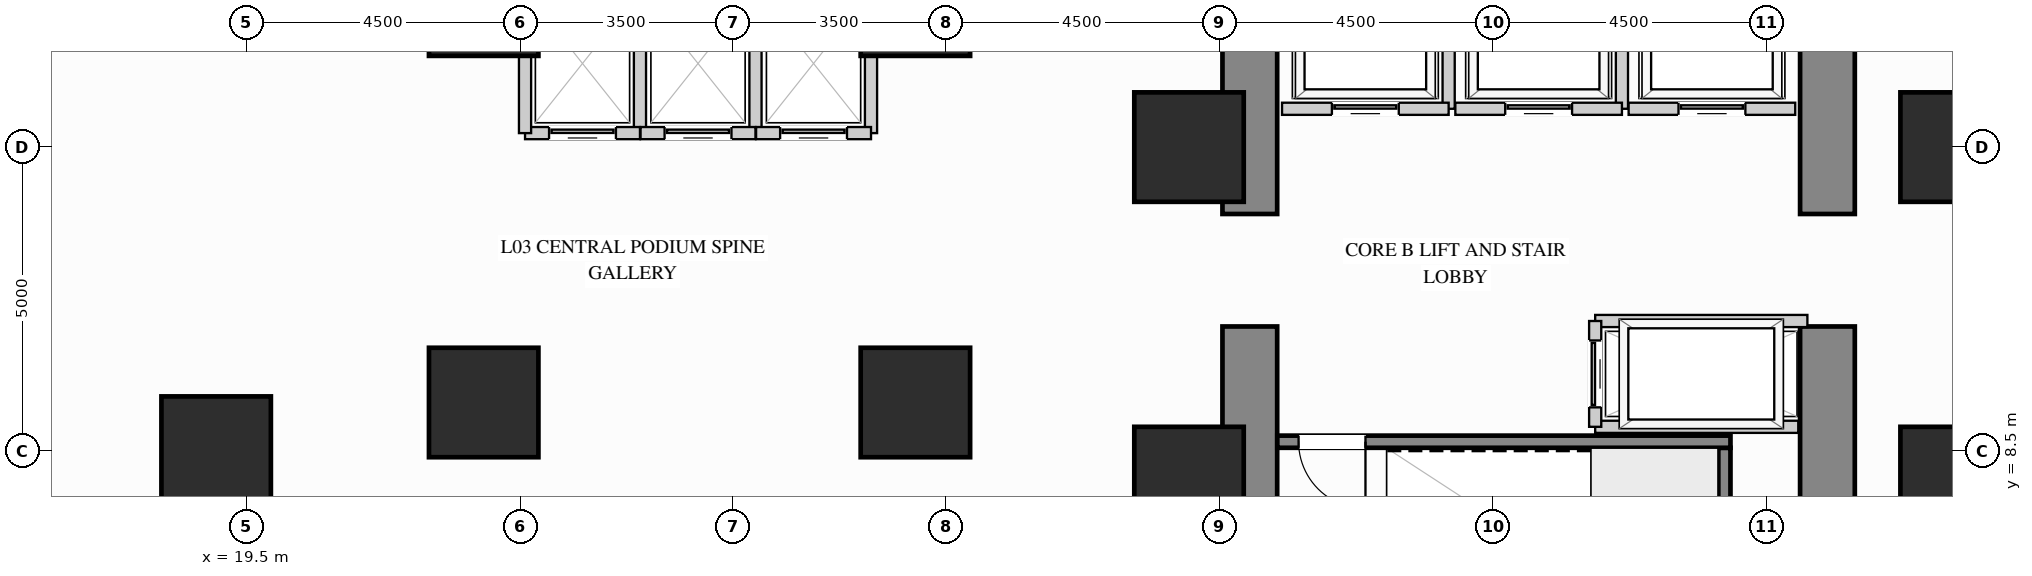
"""IFC4 building model, lengths in metres.
Left out: names, types, materials, properties, quantities, classifications, styles, units other than length and angle.
Written with IfcOpenShell. Run it as: python <this file> out.ifc"""

import sys

from ifc_helpers import new_model, si_unit, direction, frame, frame_2d, origin, origin_2d, place, context, subcontext, project, spatial, rectangle, extrude, source, transform, mapped, element, fill, save


model = new_model("IFC4")
c1 = context("Model", 3, precision=1e-05, world=origin(), true_north=direction((0.0, 1.0)))
c2 = subcontext(c1, "Body", "Model", "MODEL_VIEW")
j1 = project(units=[si_unit("LENGTHUNIT", "METRE"), si_unit("PLANEANGLEUNIT", "RADIAN")], contexts=[c1])
p1 = place(None, origin())
s1 = spatial("IfcSite", under=j1, at=p1, CompositionType="ELEMENT")
p2 = place(p1, origin())
s2 = spatial("IfcBuilding", under=s1, at=p2, CompositionType="ELEMENT")
p3 = place(p2, frame((0.0, 0.0, 13.5)))
s3 = spatial("IfcBuildingStorey", under=s2, at=p3, CompositionType="ELEMENT", Elevation=13.5)
m1 = source(origin(), c2, "Body", "SweptSolid", [
    extrude(rectangle(XDim=1.8, YDim=1.8, at=origin_2d()), origin(), (0.0, 0.0, 1.0), 4.15),
])
for number, where, z_axis, x_axis in (
    (1, (47.6, 8.0, 0.0), (0.0, 0.0, 1.0), (1.0, 0.0, 0.0)),
    (2, (47.6, 13.5, 0.0), (0.0, 0.0, 1.0), (1.0, 0.0, 0.0)),
    (3, (19.0, 8.5, 0.0), (0.0, 0.0, 1.0), (1.0, 0.0, 0.0)),
    (4, (35.0, 8.0, 0.0), (0.0, 0.0, 1.0), (1.0, 0.0, 0.0)),
    (5, (35.0, 13.5, 0.0), (0.0, 0.0, 1.0), (1.0, 0.0, 0.0)),
    (6, (23.4, 9.3, 0.0), (0.0, 0.0, 1.0), (1.0, 0.0, 0.0)),
    (7, (30.5, 9.3, 0.0), (0.0, 0.0, 1.0), (1.0, 0.0, 0.0)),
    (8, (23.4, 15.9, 0.0), (0.0, 0.0, 1.0), (1.0, 0.0, 0.0)),
    (9, (30.5, 15.9, 0.0), (0.0, 0.0, 1.0), (1.0, 0.0, 0.0)),
):
    element("IfcColumn", number, at=place(p3, frame(where, z_axis=z_axis, x_axis=x_axis)), inside=s3, PredefinedType="COLUMN", context=c2, shape_type="MappedRepresentation", body=[
        mapped(m1, transform((0.0, 0.0, 0.0), x_axis=(1.0, 0.0, 0.0), y_axis=(0.0, 1.0, 0.0), z_axis=(0.0, 0.0, 1.0))),
    ])
m2 = source(origin(), c2, "Body", "SweptSolid", [
    extrude(rectangle(XDim=5.6, YDim=0.9, at=frame_2d((2.8, 0.0))), origin(), (0.0, 0.0, 1.0), 4.15),
])
p4 = place(p3, frame((45.5, 4.95, 0.0), z_axis=(0.0, 0.0, 1.0), x_axis=(0.0, 1.0, 0.0)))
e10 = element("IfcWall", 10, at=p4, inside=s3, PredefinedType="SHEAR", context=c2, shape_type="MappedRepresentation", body=[
    mapped(m2, transform((0.0, 0.0, 0.0), x_axis=(1.0, 0.0, 0.0), y_axis=(0.0, 1.0, 0.0), z_axis=(0.0, 0.0, 1.0))),
])
m3 = source(origin(), c2, "Body", "SweptSolid", [
    extrude(rectangle(XDim=3.65, YDim=0.9, at=frame_2d((1.825, 0.0))), origin(), (0.0, 0.0, 1.0), 4.15),
])
p5 = place(p3, frame((45.5, 12.4, 0.0), z_axis=(0.0, 0.0, 1.0), x_axis=(0.0, 1.0, 0.0)))
e11 = element("IfcWall", 11, at=p5, inside=s3, PredefinedType="SHEAR", context=c2, shape_type="MappedRepresentation", body=[
    mapped(m3, transform((0.0, 0.0, 0.0), x_axis=(1.0, 0.0, 0.0), y_axis=(0.0, 1.0, 0.0), z_axis=(0.0, 0.0, 1.0))),
])
p6 = place(p3, frame((36.0, 4.95, 0.0), z_axis=(0.0, 0.0, 1.0), x_axis=(0.0, 1.0, 0.0)))
e12 = element("IfcWall", 12, at=p6, inside=s3, PredefinedType="SHEAR", context=c2, shape_type="MappedRepresentation", body=[
    mapped(m2, transform((0.0, 0.0, 0.0), x_axis=(1.0, 0.0, 0.0), y_axis=(0.0, 1.0, 0.0), z_axis=(0.0, 0.0, 1.0))),
])
p7 = place(p3, frame((36.0, 12.4, 0.0), z_axis=(0.0, 0.0, 1.0), x_axis=(0.0, 1.0, 0.0)))
e13 = element("IfcWall", 13, at=p7, inside=s3, PredefinedType="SHEAR", context=c2, shape_type="MappedRepresentation", body=[
    mapped(m3, transform((0.0, 0.0, 0.0), x_axis=(1.0, 0.0, 0.0), y_axis=(0.0, 1.0, 0.0), z_axis=(0.0, 0.0, 1.0))),
])
m4 = source(origin(), c2, "Body", "SweptSolid", [
    extrude(rectangle(XDim=1.89, YDim=0.2, at=frame_2d((0.945, 0.0))), origin(), (0.0, 0.0, 1.0), 4.135),
])
p8 = place(p3, frame((39.27, 14.13, 0.0), z_axis=(0.0, 0.0, 1.0), x_axis=(0.0, 1.0, 0.0)))
e14 = element("IfcWall", 14, at=p8, inside=s3, PredefinedType="PARTITIONING", context=c2, shape_type="MappedRepresentation", body=[
    mapped(m4, transform((0.0, 0.0, 0.0), x_axis=(1.0, 0.0, 0.0), y_axis=(0.0, 1.0, 0.0), z_axis=(0.0, 0.0, 1.0))),
])
p9 = place(p3, frame((36.53, 14.13, 0.0), z_axis=(0.0, 0.0, 1.0), x_axis=(1.0, 0.0, 0.0)))
e15 = element("IfcWall", 15, at=p9, inside=s3, PredefinedType="PARTITIONING", context=c2, shape_type="SweptSolid", body=[
    extrude(rectangle(XDim=2.74, YDim=0.2, at=frame_2d((1.37, 0.0))), origin(), (0.0, 0.0, 1.0), 4.135),
])
p10 = place(p9, frame((0.82, 0.0, 0.0)))
e16 = element("IfcOpeningElement", 16, at=p10, cuts=e15, PredefinedType="OPENING", context=c2, shape_type="SweptSolid", body=[
    extrude(rectangle(XDim=1.1, YDim=2.2, at=frame_2d((0.55, 1.1))), frame((0.0, 0.11, 0.0), z_axis=(0.0, -1.0, 0.0), x_axis=(1.0, 0.0, 0.0)), (0.0, 0.0, 1.0), 0.22),
])
p11 = place(p3, frame((42.12, 14.13, 0.0), z_axis=(0.0, 0.0, 1.0), x_axis=(0.0, 1.0, 0.0)))
e17 = element("IfcWall", 17, at=p11, inside=s3, PredefinedType="PARTITIONING", context=c2, shape_type="MappedRepresentation", body=[
    mapped(m4, transform((0.0, 0.0, 0.0), x_axis=(1.0, 0.0, 0.0), y_axis=(0.0, 1.0, 0.0), z_axis=(0.0, 0.0, 1.0))),
])
p12 = place(p3, frame((39.38, 14.13, 0.0), z_axis=(0.0, 0.0, 1.0), x_axis=(1.0, 0.0, 0.0)))
e18 = element("IfcWall", 18, at=p12, inside=s3, PredefinedType="PARTITIONING", context=c2, shape_type="SweptSolid", body=[
    extrude(rectangle(XDim=2.74, YDim=0.2, at=frame_2d((1.37, 0.0))), origin(), (0.0, 0.0, 1.0), 4.135),
])
p13 = place(p12, frame((0.82, 0.0, 0.0)))
e19 = element("IfcOpeningElement", 19, at=p13, cuts=e18, PredefinedType="OPENING", context=c2, shape_type="SweptSolid", body=[
    extrude(rectangle(XDim=1.1, YDim=2.2, at=frame_2d((0.55, 1.1))), frame((0.0, 0.11, 0.0), z_axis=(0.0, -1.0, 0.0), x_axis=(1.0, 0.0, 0.0)), (0.0, 0.0, 1.0), 0.22),
])
p14 = place(p3, frame((42.23, 14.13, 0.0), z_axis=(0.0, 0.0, 1.0), x_axis=(1.0, 0.0, 0.0)))
e20 = element("IfcWall", 20, at=p14, inside=s3, PredefinedType="PARTITIONING", context=c2, shape_type="SweptSolid", body=[
    extrude(rectangle(XDim=2.74, YDim=0.2, at=frame_2d((1.37, 0.0))), origin(), (0.0, 0.0, 1.0), 4.135),
])
p15 = place(p14, frame((0.82, 0.0, 0.0)))
e21 = element("IfcOpeningElement", 21, at=p15, cuts=e20, PredefinedType="OPENING", context=c2, shape_type="SweptSolid", body=[
    extrude(rectangle(XDim=1.1, YDim=2.2, at=frame_2d((0.55, 1.1))), frame((0.0, 0.11, 0.0), z_axis=(0.0, -1.0, 0.0), x_axis=(1.0, 0.0, 0.0)), (0.0, 0.0, 1.0), 0.22),
])
m5 = source(origin(), c2, "Body", "SweptSolid", [
    extrude(rectangle(XDim=2.29, YDim=0.2, at=frame_2d((1.145, 0.0))), origin(), (0.0, 0.0, 1.0), 4.135),
])
p16 = place(p3, frame((25.97, 13.73, 0.0), z_axis=(0.0, 0.0, 1.0), x_axis=(0.0, 1.0, 0.0)))
e22 = element("IfcWall", 22, at=p16, inside=s3, PredefinedType="PARTITIONING", context=c2, shape_type="MappedRepresentation", body=[
    mapped(m5, transform((0.0, 0.0, 0.0), x_axis=(1.0, 0.0, 0.0), y_axis=(0.0, 1.0, 0.0), z_axis=(0.0, 0.0, 1.0))),
])
p17 = place(p3, frame((24.08, 13.73, 0.0), z_axis=(0.0, 0.0, 1.0), x_axis=(1.0, 0.0, 0.0)))
e23 = element("IfcWall", 23, at=p17, inside=s3, PredefinedType="PARTITIONING", context=c2, shape_type="SweptSolid", body=[
    extrude(rectangle(XDim=1.89, YDim=0.2, at=frame_2d((0.945, 0.0))), origin(), (0.0, 0.0, 1.0), 4.135),
])
p18 = place(p17, frame((0.395, 0.0, 0.0)))
e24 = element("IfcOpeningElement", 24, at=p18, cuts=e23, PredefinedType="OPENING", context=c2, shape_type="SweptSolid", body=[
    extrude(rectangle(XDim=1.1, YDim=2.2, at=frame_2d((0.55, 1.1))), frame((0.0, 0.11, 0.0), z_axis=(0.0, -1.0, 0.0), x_axis=(1.0, 0.0, 0.0)), (0.0, 0.0, 1.0), 0.22),
])
for number, where, z_axis, x_axis in (
    (25, (24.08, 13.73, 0.0), (0.0, 0.0, 1.0), (0.0, 1.0, 0.0)),
    (26, (27.87, 13.73, 0.0), (0.0, 0.0, 1.0), (0.0, 1.0, 0.0)),
):
    element("IfcWall", number, at=place(p3, frame(where, z_axis=z_axis, x_axis=x_axis)), inside=s3, PredefinedType="PARTITIONING", context=c2, shape_type="MappedRepresentation", body=[
        mapped(m5, transform((0.0, 0.0, 0.0), x_axis=(1.0, 0.0, 0.0), y_axis=(0.0, 1.0, 0.0), z_axis=(0.0, 0.0, 1.0))),
    ])
p19 = place(p3, frame((25.98, 13.73, 0.0), z_axis=(0.0, 0.0, 1.0), x_axis=(1.0, 0.0, 0.0)))
e27 = element("IfcWall", 27, at=p19, inside=s3, PredefinedType="PARTITIONING", context=c2, shape_type="SweptSolid", body=[
    extrude(rectangle(XDim=1.89, YDim=0.2, at=frame_2d((0.945, 0.0))), origin(), (0.0, 0.0, 1.0), 4.135),
])
p20 = place(p19, frame((0.395, 0.0, 0.0)))
e28 = element("IfcOpeningElement", 28, at=p20, cuts=e27, PredefinedType="OPENING", context=c2, shape_type="SweptSolid", body=[
    extrude(rectangle(XDim=1.1, YDim=2.2, at=frame_2d((0.55, 1.1))), frame((0.0, 0.11, 0.0), z_axis=(0.0, -1.0, 0.0), x_axis=(1.0, 0.0, 0.0)), (0.0, 0.0, 1.0), 0.22),
])
p21 = place(p3, frame((29.77, 13.73, 0.0), z_axis=(0.0, 0.0, 1.0), x_axis=(0.0, 1.0, 0.0)))
e29 = element("IfcWall", 29, at=p21, inside=s3, PredefinedType="PARTITIONING", context=c2, shape_type="MappedRepresentation", body=[
    mapped(m5, transform((0.0, 0.0, 0.0), x_axis=(1.0, 0.0, 0.0), y_axis=(0.0, 1.0, 0.0), z_axis=(0.0, 0.0, 1.0))),
])
p22 = place(p3, frame((27.88, 13.73, 0.0), z_axis=(0.0, 0.0, 1.0), x_axis=(1.0, 0.0, 0.0)))
e30 = element("IfcWall", 30, at=p22, inside=s3, PredefinedType="PARTITIONING", context=c2, shape_type="SweptSolid", body=[
    extrude(rectangle(XDim=1.89, YDim=0.2, at=frame_2d((0.945, 0.0))), origin(), (0.0, 0.0, 1.0), 4.135),
])
p23 = place(p22, frame((0.395, 0.0, 0.0)))
e31 = element("IfcOpeningElement", 31, at=p23, cuts=e30, PredefinedType="OPENING", context=c2, shape_type="SweptSolid", body=[
    extrude(rectangle(XDim=1.1, YDim=2.2, at=frame_2d((0.55, 1.1))), frame((0.0, 0.11, 0.0), z_axis=(0.0, -1.0, 0.0), x_axis=(1.0, 0.0, 0.0)), (0.0, 0.0, 1.0), 0.22),
])
m6 = source(origin(), c2, "Body", "SweptSolid", [
    extrude(rectangle(XDim=3.49, YDim=0.2, at=frame_2d((1.745, 0.0))), origin(), (0.0, 0.0, 1.0), 4.135),
])
p24 = place(p3, frame((41.68, 10.64, 0.0), z_axis=(0.0, 0.0, 1.0), x_axis=(1.0, 0.0, 0.0)))
e32 = element("IfcWall", 32, at=p24, inside=s3, PredefinedType="PARTITIONING", context=c2, shape_type="MappedRepresentation", body=[
    mapped(m6, transform((0.0, 0.0, 0.0), x_axis=(1.0, 0.0, 0.0), y_axis=(0.0, 1.0, 0.0), z_axis=(0.0, 0.0, 1.0))),
])
m7 = source(origin(), c2, "Body", "SweptSolid", [
    extrude(rectangle(XDim=3.34, YDim=0.2, at=frame_2d((1.67, 0.0))), origin(), (0.0, 0.0, 1.0), 4.135),
])
p25 = place(p3, frame((41.68, 8.9, 0.0), z_axis=(0.0, 0.0, 1.0), x_axis=(1.0, 0.0, 0.0)))
e33 = element("IfcWall", 33, at=p25, inside=s3, PredefinedType="PARTITIONING", context=c2, shape_type="MappedRepresentation", body=[
    mapped(m7, transform((0.0, 0.0, 0.0), x_axis=(1.0, 0.0, 0.0), y_axis=(0.0, 1.0, 0.0), z_axis=(0.0, 0.0, 1.0))),
])
p26 = place(p3, frame((41.68, 8.9, 0.0), z_axis=(0.0, 0.0, 1.0), x_axis=(0.0, 1.0, 0.0)))
e34 = element("IfcWall", 34, at=p26, inside=s3, PredefinedType="PARTITIONING", context=c2, shape_type="SweptSolid", body=[
    extrude(rectangle(XDim=1.74, YDim=0.2, at=frame_2d((0.87, 0.0))), origin(), (0.0, 0.0, 1.0), 4.135),
])
p27 = place(p26, frame((0.32, 0.0, 0.0)))
e35 = element("IfcOpeningElement", 35, at=p27, cuts=e34, PredefinedType="OPENING", context=c2, shape_type="SweptSolid", body=[
    extrude(rectangle(XDim=1.1, YDim=2.2, at=frame_2d((0.55, 1.1))), frame((0.0, 0.11, 0.0), z_axis=(0.0, -1.0, 0.0), x_axis=(1.0, 0.0, 0.0)), (0.0, 0.0, 1.0), 0.22),
])
m8 = source(origin(), c2, "Body", "SweptSolid", [
    extrude(rectangle(XDim=3.603, YDim=0.2, at=frame_2d((1.802, 0.0))), origin(), (0.0, 0.0, 1.0), 4.15),
])
p28 = place(p3, frame((43.805, 4.952, 0.0), z_axis=(0.0, 0.0, 1.0), x_axis=(0.0, 1.0, 0.0)))
e36 = element("IfcWall", 36, at=p28, inside=s3, PredefinedType="SHEAR", context=c2, shape_type="MappedRepresentation", body=[
    mapped(m8, transform((0.0, 0.0, 0.0), x_axis=(1.0, 0.0, 0.0), y_axis=(0.0, 1.0, 0.0), z_axis=(0.0, 0.0, 1.0))),
])
p29 = place(p3, frame((36.452, 8.655, 0.0), z_axis=(0.0, 0.0, 1.0), x_axis=(1.0, 0.0, 0.0)))
e37 = element("IfcWall", 37, at=p29, inside=s3, PredefinedType="SHEAR", context=c2, shape_type="SweptSolid", body=[
    extrude(rectangle(XDim=7.453, YDim=0.2, at=frame_2d((3.727, 0.0))), origin(), (0.0, 0.0, 1.0), 4.15),
])
p30 = place(p29, frame((0.35, 0.0, 0.0)))
e38 = element("IfcOpeningElement", 38, at=p30, cuts=e37, PredefinedType="OPENING", context=c2, shape_type="SweptSolid", body=[
    extrude(rectangle(XDim=1.1, YDim=2.15, at=frame_2d((0.55, 1.075))), frame((0.0, 0.11, 0.0), z_axis=(0.0, -1.0, 0.0), x_axis=(1.0, 0.0, 0.0)), (0.0, 0.0, 1.0), 0.22),
])
m9 = source(origin(), c2, "Body", "SweptSolid", [
    extrude(rectangle(XDim=1.1, YDim=2.2, at=frame_2d((0.55, 1.1))), frame((0.0, 0.025, 0.0), z_axis=(0.0, -1.0, 0.0), x_axis=(1.0, 0.0, 0.0)), (0.0, 0.0, 1.0), 0.05),
])
p31 = place(p10, origin())
e39 = element("IfcDoor", 39, at=p31, inside=s3, OperationType="SLIDING_TO_LEFT", PredefinedType="DOOR", context=c2, shape_type="MappedRepresentation", body=[
    mapped(m9, transform((0.0, 0.0, 0.0), x_axis=(1.0, 0.0, 0.0), y_axis=(0.0, 1.0, 0.0), z_axis=(0.0, 0.0, 1.0))),
])
fill(e16, e39)
p32 = place(p13, origin())
e40 = element("IfcDoor", 40, at=p32, inside=s3, OperationType="SLIDING_TO_LEFT", PredefinedType="DOOR", context=c2, shape_type="MappedRepresentation", body=[
    mapped(m9, transform((0.0, 0.0, 0.0), x_axis=(1.0, 0.0, 0.0), y_axis=(0.0, 1.0, 0.0), z_axis=(0.0, 0.0, 1.0))),
])
fill(e19, e40)
p33 = place(p15, origin())
e41 = element("IfcDoor", 41, at=p33, inside=s3, OperationType="SLIDING_TO_LEFT", PredefinedType="DOOR", context=c2, shape_type="MappedRepresentation", body=[
    mapped(m9, transform((0.0, 0.0, 0.0), x_axis=(1.0, 0.0, 0.0), y_axis=(0.0, 1.0, 0.0), z_axis=(0.0, 0.0, 1.0))),
])
fill(e21, e41)
p34 = place(p18, origin())
e42 = element("IfcDoor", 42, at=p34, inside=s3, OperationType="SLIDING_TO_LEFT", PredefinedType="DOOR", context=c2, shape_type="MappedRepresentation", body=[
    mapped(m9, transform((0.0, 0.0, 0.0), x_axis=(1.0, 0.0, 0.0), y_axis=(0.0, 1.0, 0.0), z_axis=(0.0, 0.0, 1.0))),
])
fill(e24, e42)
p35 = place(p20, origin())
e43 = element("IfcDoor", 43, at=p35, inside=s3, OperationType="SLIDING_TO_LEFT", PredefinedType="DOOR", context=c2, shape_type="MappedRepresentation", body=[
    mapped(m9, transform((0.0, 0.0, 0.0), x_axis=(1.0, 0.0, 0.0), y_axis=(0.0, 1.0, 0.0), z_axis=(0.0, 0.0, 1.0))),
])
fill(e28, e43)
p36 = place(p23, origin())
e44 = element("IfcDoor", 44, at=p36, inside=s3, OperationType="SLIDING_TO_LEFT", PredefinedType="DOOR", context=c2, shape_type="MappedRepresentation", body=[
    mapped(m9, transform((0.0, 0.0, 0.0), x_axis=(1.0, 0.0, 0.0), y_axis=(0.0, 1.0, 0.0), z_axis=(0.0, 0.0, 1.0))),
])
fill(e31, e44)
p37 = place(p27, origin())
e45 = element("IfcDoor", 45, at=p37, inside=s3, OperationType="SLIDING_TO_LEFT", PredefinedType="DOOR", context=c2, shape_type="MappedRepresentation", body=[
    mapped(m9, transform((0.0, 0.0, 0.0), x_axis=(1.0, 0.0, 0.0), y_axis=(0.0, 1.0, 0.0), z_axis=(0.0, 0.0, 1.0))),
])
fill(e35, e45)
m10 = source(origin(), c2, "Body", "SweptSolid", [
    extrude(rectangle(XDim=1.1, YDim=2.15, at=frame_2d((0.55, 1.075))), frame((0.0, 0.025, 0.0), z_axis=(0.0, -1.0, 0.0), x_axis=(1.0, 0.0, 0.0)), (0.0, 0.0, 1.0), 0.05),
])
p38 = place(p30, origin())
e46 = element("IfcDoor", 46, at=p38, inside=s3, OperationType="SINGLE_SWING_RIGHT", PredefinedType="DOOR", context=c2, shape_type="MappedRepresentation", body=[
    mapped(m10, transform((0.0, 0.0, 0.0), x_axis=(1.0, 0.0, 0.0), y_axis=(0.0, 1.0, 0.0), z_axis=(0.0, 0.0, 1.0))),
])
fill(e38, e46)
save(model, sys.argv[1])
